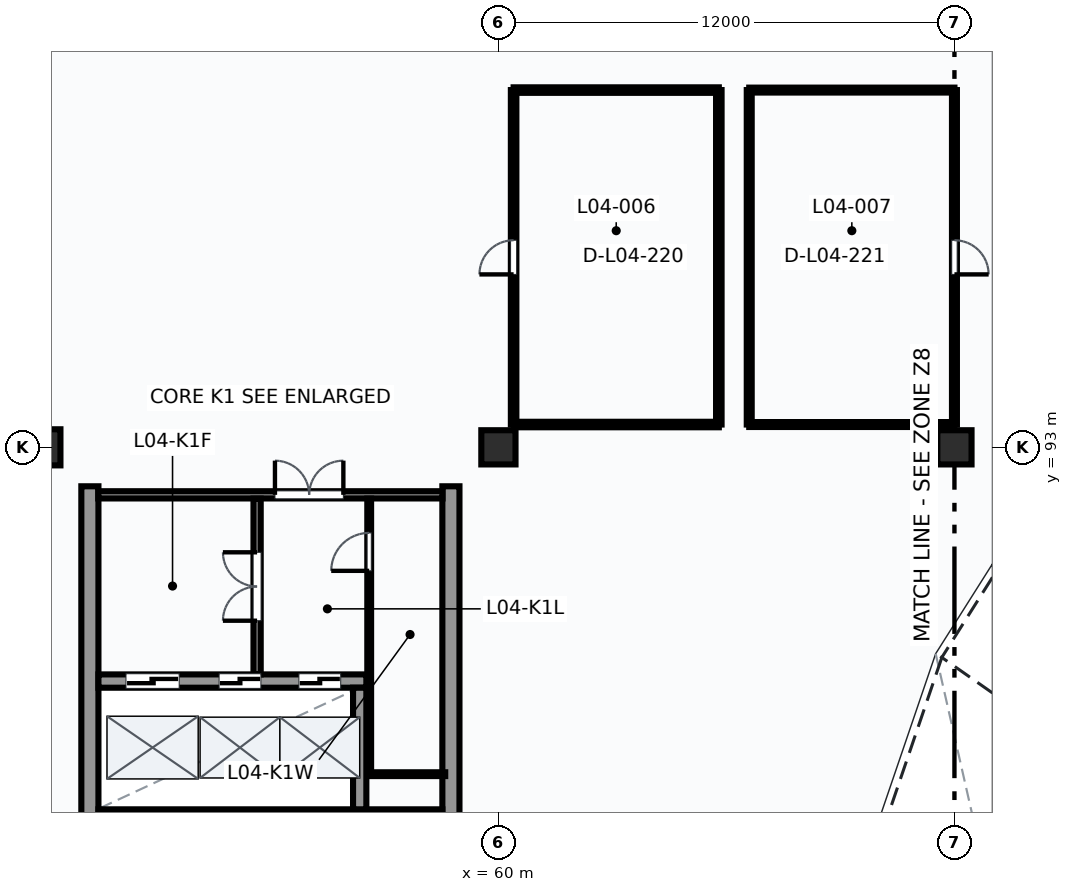
"""IFC4 building model, lengths in metres.
Left out: names, types, materials, properties, quantities, classifications, styles, units other than length and angle.
Written with IfcOpenShell. Run it as: python <this file> out.ifc"""

import sys

from ifc_helpers import new_model, si_unit, direction, frame, frame_2d, origin, origin_2d, place, context, subcontext, project, spatial, rectangle, extrude, element, fill, save


model = new_model("IFC4")
c1 = context("Model", 3, precision=1e-05, world=origin(), true_north=direction((0.0, 1.0)))
c2 = subcontext(c1, "Body", "Model", "MODEL_VIEW")
j1 = project(units=[si_unit("LENGTHUNIT", "METRE"), si_unit("PLANEANGLEUNIT", "RADIAN")], contexts=[c1])
p1 = place(None, origin())
s1 = spatial("IfcSite", under=j1, at=p1, CompositionType="ELEMENT")
p2 = place(p1, origin())
s2 = spatial("IfcBuilding", under=s1, at=p2, CompositionType="ELEMENT")
p3 = place(p2, frame((0.0, 0.0, 19.2)))
s3 = spatial("IfcBuildingStorey", under=s2, at=p3, CompositionType="ELEMENT", Elevation=19.2)
p4 = place(p3, frame((48.0, 93.0, 0.0), z_axis=(0.0, 0.0, 1.0), x_axis=(1.0, 0.0, 0.0)))
e1 = element("IfcColumn", 1, at=p4, inside=s3, PredefinedType="COLUMN", context=c2, shape_type="SweptSolid", body=[
    extrude(rectangle(XDim=0.95, YDim=0.95, at=origin_2d()), origin(), (0.0, 0.0, 1.0), 5.4),
])
for number, where, z_axis, x_axis in (
    (2, (60.0, 93.0, 0.0), (0.0, 0.0, 1.0), (1.0, 0.0, 0.0)),
    (3, (72.0, 93.0, 0.0), (0.0, 0.0, 1.0), (1.0, 0.0, 0.0)),
):
    element("IfcColumn", number, at=place(p3, frame(where, z_axis=z_axis, x_axis=x_axis)), inside=s3, PredefinedType="COLUMN", context=c2, shape_type="SweptSolid", body=[
        extrude(rectangle(XDim=0.9, YDim=0.9, at=origin_2d()), origin(), (0.0, 0.0, 1.0), 5.4),
    ])
for number, where, z_axis, x_axis in (
    (4, (49.25, 83.025, 0.0), (0.0, 0.0, 1.0), (0.0, 1.0, 0.0)),
    (5, (58.75, 83.025, 0.0), (0.0, 0.0, 1.0), (0.0, 1.0, 0.0)),
):
    element("IfcWall", number, at=place(p3, frame(where, z_axis=z_axis, x_axis=x_axis)), inside=s3, PredefinedType="SHEAR", context=c2, shape_type="SweptSolid", body=[
        extrude(rectangle(XDim=8.95, YDim=0.45, at=frame_2d((4.475, 0.0))), origin(), (0.0, 0.0, 1.0), 5.4),
    ])
p5 = place(p3, frame((49.475, 83.25, 0.0), z_axis=(0.0, 0.0, 1.0), x_axis=(1.0, 0.0, 0.0)))
e6 = element("IfcWall", 6, at=p5, inside=s3, PredefinedType="SHEAR", context=c2, shape_type="SweptSolid", body=[
    extrude(rectangle(XDim=9.05, YDim=0.45, at=frame_2d((4.525, 0.0))), origin(), (0.0, 0.0, 1.0), 5.4),
])
p6 = place(p3, frame((49.475, 86.85, 0.0), z_axis=(0.0, 0.0, 1.0), x_axis=(1.0, 0.0, 0.0)))
e7 = element("IfcWall", 7, at=p6, inside=s3, PredefinedType="SHEAR", context=c2, shape_type="SweptSolid", body=[
    extrude(rectangle(XDim=7.05, YDim=0.35, at=frame_2d((3.525, 0.0))), origin(), (0.0, 0.0, 1.0), 5.4),
])
p7 = place(p6, frame((0.725, 0.0, 0.0)))
e8 = element("IfcOpeningElement", 8, at=p7, cuts=e7, PredefinedType="OPENING", context=c2, shape_type="SweptSolid", body=[
    extrude(rectangle(XDim=1.4, YDim=2.3, at=frame_2d((0.7, 1.15))), frame((0.0, 0.185, 0.0), z_axis=(0.0, -1.0, 0.0), x_axis=(1.0, 0.0, 0.0)), (0.0, 0.0, 1.0), 0.37),
])
p8 = place(p6, frame((3.175, 0.0, 0.0)))
e9 = element("IfcOpeningElement", 9, at=p8, cuts=e7, PredefinedType="OPENING", context=c2, shape_type="SweptSolid", body=[
    extrude(rectangle(XDim=1.1, YDim=2.2, at=frame_2d((0.55, 1.1))), frame((0.0, 0.185, 0.0), z_axis=(0.0, -1.0, 0.0), x_axis=(1.0, 0.0, 0.0)), (0.0, 0.0, 1.0), 0.37),
])
p9 = place(p6, frame((5.275, 0.0, 0.0)))
e10 = element("IfcOpeningElement", 10, at=p9, cuts=e7, PredefinedType="OPENING", context=c2, shape_type="SweptSolid", body=[
    extrude(rectangle(XDim=1.1, YDim=2.2, at=frame_2d((0.55, 1.1))), frame((0.0, 0.185, 0.0), z_axis=(0.0, -1.0, 0.0), x_axis=(1.0, 0.0, 0.0)), (0.0, 0.0, 1.0), 0.37),
])
p10 = place(p3, frame((56.35, 83.475, 0.0), z_axis=(0.0, 0.0, 1.0), x_axis=(0.0, 1.0, 0.0)))
e11 = element("IfcWall", 11, at=p10, inside=s3, PredefinedType="SHEAR", context=c2, shape_type="SweptSolid", body=[
    extrude(rectangle(XDim=3.2, YDim=0.35, at=frame_2d((1.6, 0.0))), origin(), (0.0, 0.0, 1.0), 5.4),
])
p11 = place(p3, frame((49.47, 91.75, 0.0), z_axis=(0.0, 0.0, 1.0), x_axis=(1.0, 0.0, 0.0)))
e12 = element("IfcWall", 12, at=p11, inside=s3, PredefinedType="PARTITIONING", context=c2, shape_type="SweptSolid", body=[
    extrude(rectangle(XDim=9.06, YDim=0.19, at=frame_2d((4.53, 0.0))), origin(), (0.0, 0.0, 1.0), 5.07),
])
p12 = place(p11, frame((4.65, 0.0, 0.0)))
e13 = element("IfcOpeningElement", 13, at=p12, cuts=e12, PredefinedType="OPENING", context=c2, shape_type="SweptSolid", body=[
    extrude(rectangle(XDim=1.8, YDim=2.3, at=frame_2d((0.9, 1.15))), frame((0.0, 0.105, 0.0), z_axis=(0.0, -1.0, 0.0), x_axis=(1.0, 0.0, 0.0)), (0.0, 0.0, 1.0), 0.21),
])
p13 = place(p3, frame((53.65, 87.025, 0.0), z_axis=(0.0, 0.0, 1.0), x_axis=(0.0, 1.0, 0.0)))
e14 = element("IfcWall", 14, at=p13, inside=s3, PredefinedType="PARTITIONING", context=c2, shape_type="SweptSolid", body=[
    extrude(rectangle(XDim=4.625, YDim=0.19, at=frame_2d((2.312, 0.0))), origin(), (0.0, 0.0, 1.0), 5.07),
])
p14 = place(p13, frame((1.413, 0.0, 0.0)))
e15 = element("IfcOpeningElement", 15, at=p14, cuts=e14, PredefinedType="OPENING", context=c2, shape_type="SweptSolid", body=[
    extrude(rectangle(XDim=1.8, YDim=2.2, at=frame_2d((0.9, 1.1))), frame((0.0, 0.105, 0.0), z_axis=(0.0, -1.0, 0.0), x_axis=(1.0, 0.0, 0.0)), (0.0, 0.0, 1.0), 0.21),
])
p15 = place(p3, frame((56.6, 84.4, 0.0), z_axis=(0.0, 0.0, 1.0), x_axis=(0.0, 1.0, 0.0)))
e16 = element("IfcWall", 16, at=p15, inside=s3, PredefinedType="PARTITIONING", context=c2, shape_type="SweptSolid", body=[
    extrude(rectangle(XDim=7.25, YDim=0.1, at=frame_2d((3.625, 0.0))), origin(), (0.0, 0.0, 1.0), 5.07),
])
p16 = place(p15, frame((5.35, 0.0, 0.0)))
e17 = element("IfcOpeningElement", 17, at=p16, cuts=e16, PredefinedType="OPENING", context=c2, shape_type="SweptSolid", body=[
    extrude(rectangle(XDim=1.0, YDim=2.1, at=frame_2d((0.5, 1.05))), frame((0.0, 0.06, 0.0), z_axis=(0.0, -1.0, 0.0), x_axis=(1.0, 0.0, 0.0)), (0.0, 0.0, 1.0), 0.12),
])
p17 = place(p3, frame((56.6, 84.4, 0.0), z_axis=(0.0, 0.0, 1.0), x_axis=(1.0, 0.0, 0.0)))
e18 = element("IfcWall", 18, at=p17, inside=s3, PredefinedType="PARTITIONING", context=c2, shape_type="SweptSolid", body=[
    extrude(rectangle(XDim=2.0, YDim=0.1, at=frame_2d((1.0, 0.0))), origin(), (0.0, 0.0, 1.0), 5.07),
])
p18 = place(p3, frame((65.8, 102.4, 0.0), z_axis=(0.0, 0.0, 1.0), x_axis=(0.0, -1.0, 0.0)))
e19 = element("IfcWall", 19, at=p18, inside=s3, PredefinedType="PARTITIONING", context=c2, shape_type="SweptSolid", body=[
    extrude(rectangle(XDim=8.8, YDim=0.145, at=frame_2d((4.4, 0.0))), origin(), (0.0, 0.0, 1.0), 4.506),
])
p19 = place(p3, frame((65.8, 93.6, 0.0), z_axis=(0.0, 0.0, 1.0), x_axis=(-1.0, 0.0, 0.0)))
e20 = element("IfcWall", 20, at=p19, inside=s3, PredefinedType="PARTITIONING", context=c2, shape_type="SweptSolid", body=[
    extrude(rectangle(XDim=5.4, YDim=0.145, at=frame_2d((2.7, 0.0))), origin(), (0.0, 0.0, 1.0), 5.07),
])
p20 = place(p3, frame((60.4, 93.6, 0.0), z_axis=(0.0, 0.0, 1.0), x_axis=(0.0, 1.0, 0.0)))
e21 = element("IfcWall", 21, at=p20, inside=s3, PredefinedType="PARTITIONING", context=c2, shape_type="SweptSolid", body=[
    extrude(rectangle(XDim=8.8, YDim=0.145, at=frame_2d((4.4, 0.0))), origin(), (0.0, 0.0, 1.0), 4.506),
])
p21 = place(p20, frame((3.95, 0.0, 0.0)))
e22 = element("IfcOpeningElement", 22, at=p21, cuts=e21, PredefinedType="OPENING", context=c2, shape_type="SweptSolid", body=[
    extrude(rectangle(XDim=0.9, YDim=2.1, at=frame_2d((0.45, 1.05))), frame((0.0, 0.083, 0.0), z_axis=(0.0, -1.0, 0.0), x_axis=(1.0, 0.0, 0.0)), (0.0, 0.0, 1.0), 0.165),
])
p22 = place(p3, frame((60.4, 102.4, 0.0), z_axis=(0.0, 0.0, 1.0), x_axis=(1.0, 0.0, 0.0)))
e23 = element("IfcWall", 23, at=p22, inside=s3, PredefinedType="PARTITIONING", context=c2, shape_type="SweptSolid", body=[
    extrude(rectangle(XDim=5.4, YDim=0.145, at=frame_2d((2.7, 0.0))), origin(), (0.0, 0.0, 1.0), 5.07),
])
p23 = place(p3, frame((72.0, 102.4, 0.0), z_axis=(0.0, 0.0, 1.0), x_axis=(0.0, -1.0, 0.0)))
e24 = element("IfcWall", 24, at=p23, inside=s3, PredefinedType="PARTITIONING", context=c2, shape_type="SweptSolid", body=[
    extrude(rectangle(XDim=8.8, YDim=0.13, at=frame_2d((4.4, 0.0))), origin(), (0.0, 0.0, 1.0), 4.05),
])
p24 = place(p23, frame((3.95, 0.0, 0.0)))
e25 = element("IfcOpeningElement", 25, at=p24, cuts=e24, PredefinedType="OPENING", context=c2, shape_type="SweptSolid", body=[
    extrude(rectangle(XDim=0.9, YDim=2.1, at=frame_2d((0.45, 1.05))), frame((0.0, 0.075, 0.0), z_axis=(0.0, -1.0, 0.0), x_axis=(1.0, 0.0, 0.0)), (0.0, 0.0, 1.0), 0.15),
])
p25 = place(p3, frame((72.0, 93.6, 0.0), z_axis=(0.0, 0.0, 1.0), x_axis=(-1.0, 0.0, 0.0)))
e26 = element("IfcWall", 26, at=p25, inside=s3, PredefinedType="PARTITIONING", context=c2, shape_type="SweptSolid", body=[
    extrude(rectangle(XDim=5.4, YDim=0.13, at=frame_2d((2.7, 0.0))), origin(), (0.0, 0.0, 1.0), 4.05),
])
p26 = place(p3, frame((66.6, 93.6, 0.0), z_axis=(0.0, 0.0, 1.0), x_axis=(0.0, 1.0, 0.0)))
e27 = element("IfcWall", 27, at=p26, inside=s3, PredefinedType="PARTITIONING", context=c2, shape_type="SweptSolid", body=[
    extrude(rectangle(XDim=8.8, YDim=0.13, at=frame_2d((4.4, 0.0))), origin(), (0.0, 0.0, 1.0), 4.506),
])
p27 = place(p3, frame((66.6, 102.4, 0.0), z_axis=(0.0, 0.0, 1.0), x_axis=(1.0, 0.0, 0.0)))
e28 = element("IfcWall", 28, at=p27, inside=s3, PredefinedType="PARTITIONING", context=c2, shape_type="SweptSolid", body=[
    extrude(rectangle(XDim=5.4, YDim=0.13, at=frame_2d((2.7, 0.0))), origin(), (0.0, 0.0, 1.0), 4.05),
])
p28 = place(p7, origin())
e29 = element("IfcDoor", 29, at=p28, inside=s3, OperationType="SLIDING_TO_LEFT", PredefinedType="DOOR", context=c2, shape_type="SweptSolid", body=[
    extrude(rectangle(XDim=1.4, YDim=2.3, at=frame_2d((0.7, 1.15))), frame((0.0, 0.025, 0.0), z_axis=(0.0, -1.0, 0.0), x_axis=(1.0, 0.0, 0.0)), (0.0, 0.0, 1.0), 0.05),
])
fill(e8, e29)
p29 = place(p8, origin())
e30 = element("IfcDoor", 30, at=p29, inside=s3, OperationType="SLIDING_TO_LEFT", PredefinedType="DOOR", context=c2, shape_type="SweptSolid", body=[
    extrude(rectangle(XDim=1.1, YDim=2.2, at=frame_2d((0.55, 1.1))), frame((0.0, 0.025, 0.0), z_axis=(0.0, -1.0, 0.0), x_axis=(1.0, 0.0, 0.0)), (0.0, 0.0, 1.0), 0.05),
])
fill(e9, e30)
p30 = place(p9, origin())
e31 = element("IfcDoor", 31, at=p30, inside=s3, OperationType="SLIDING_TO_LEFT", PredefinedType="DOOR", context=c2, shape_type="SweptSolid", body=[
    extrude(rectangle(XDim=1.1, YDim=2.2, at=frame_2d((0.55, 1.1))), frame((0.0, 0.025, 0.0), z_axis=(0.0, -1.0, 0.0), x_axis=(1.0, 0.0, 0.0)), (0.0, 0.0, 1.0), 0.05),
])
fill(e10, e31)
p31 = place(p12, origin())
e32 = element("IfcDoor", 32, at=p31, inside=s3, OperationType="DOUBLE_DOOR_SINGLE_SWING", PredefinedType="DOOR", context=c2, shape_type="SweptSolid", body=[
    extrude(rectangle(XDim=1.8, YDim=2.3, at=frame_2d((0.9, 1.15))), frame((0.0, 0.025, 0.0), z_axis=(0.0, -1.0, 0.0), x_axis=(1.0, 0.0, 0.0)), (0.0, 0.0, 1.0), 0.05),
])
fill(e13, e32)
p32 = place(p14, origin())
e33 = element("IfcDoor", 33, at=p32, inside=s3, OperationType="DOUBLE_DOOR_SINGLE_SWING", PredefinedType="DOOR", context=c2, shape_type="SweptSolid", body=[
    extrude(rectangle(XDim=1.8, YDim=2.2, at=frame_2d((0.9, 1.1))), frame((0.0, 0.025, 0.0), z_axis=(0.0, -1.0, 0.0), x_axis=(1.0, 0.0, 0.0)), (0.0, 0.0, 1.0), 0.05),
])
fill(e15, e33)
p33 = place(p16, origin())
e34 = element("IfcDoor", 34, at=p33, inside=s3, OperationType="SINGLE_SWING_LEFT", PredefinedType="DOOR", context=c2, shape_type="SweptSolid", body=[
    extrude(rectangle(XDim=1.0, YDim=2.1, at=frame_2d((0.5, 1.05))), frame((0.0, 0.025, 0.0), z_axis=(0.0, -1.0, 0.0), x_axis=(1.0, 0.0, 0.0)), (0.0, 0.0, 1.0), 0.05),
])
fill(e17, e34)
p34 = place(p21, origin())
e35 = element("IfcDoor", 35, at=p34, inside=s3, OperationType="SINGLE_SWING_LEFT", PredefinedType="DOOR", context=c2, shape_type="SweptSolid", body=[
    extrude(rectangle(XDim=0.9, YDim=2.1, at=frame_2d((0.45, 1.05))), frame((0.0, 0.025, 0.0), z_axis=(0.0, -1.0, 0.0), x_axis=(1.0, 0.0, 0.0)), (0.0, 0.0, 1.0), 0.05),
])
fill(e22, e35)
p35 = place(p24, origin())
e36 = element("IfcDoor", 36, at=p35, inside=s3, OperationType="SINGLE_SWING_RIGHT", PredefinedType="DOOR", context=c2, shape_type="SweptSolid", body=[
    extrude(rectangle(XDim=0.9, YDim=2.1, at=frame_2d((0.45, 1.05))), frame((0.0, 0.025, 0.0), z_axis=(0.0, -1.0, 0.0), x_axis=(1.0, 0.0, 0.0)), (0.0, 0.0, 1.0), 0.05),
])
fill(e25, e36)
save(model, sys.argv[1])
